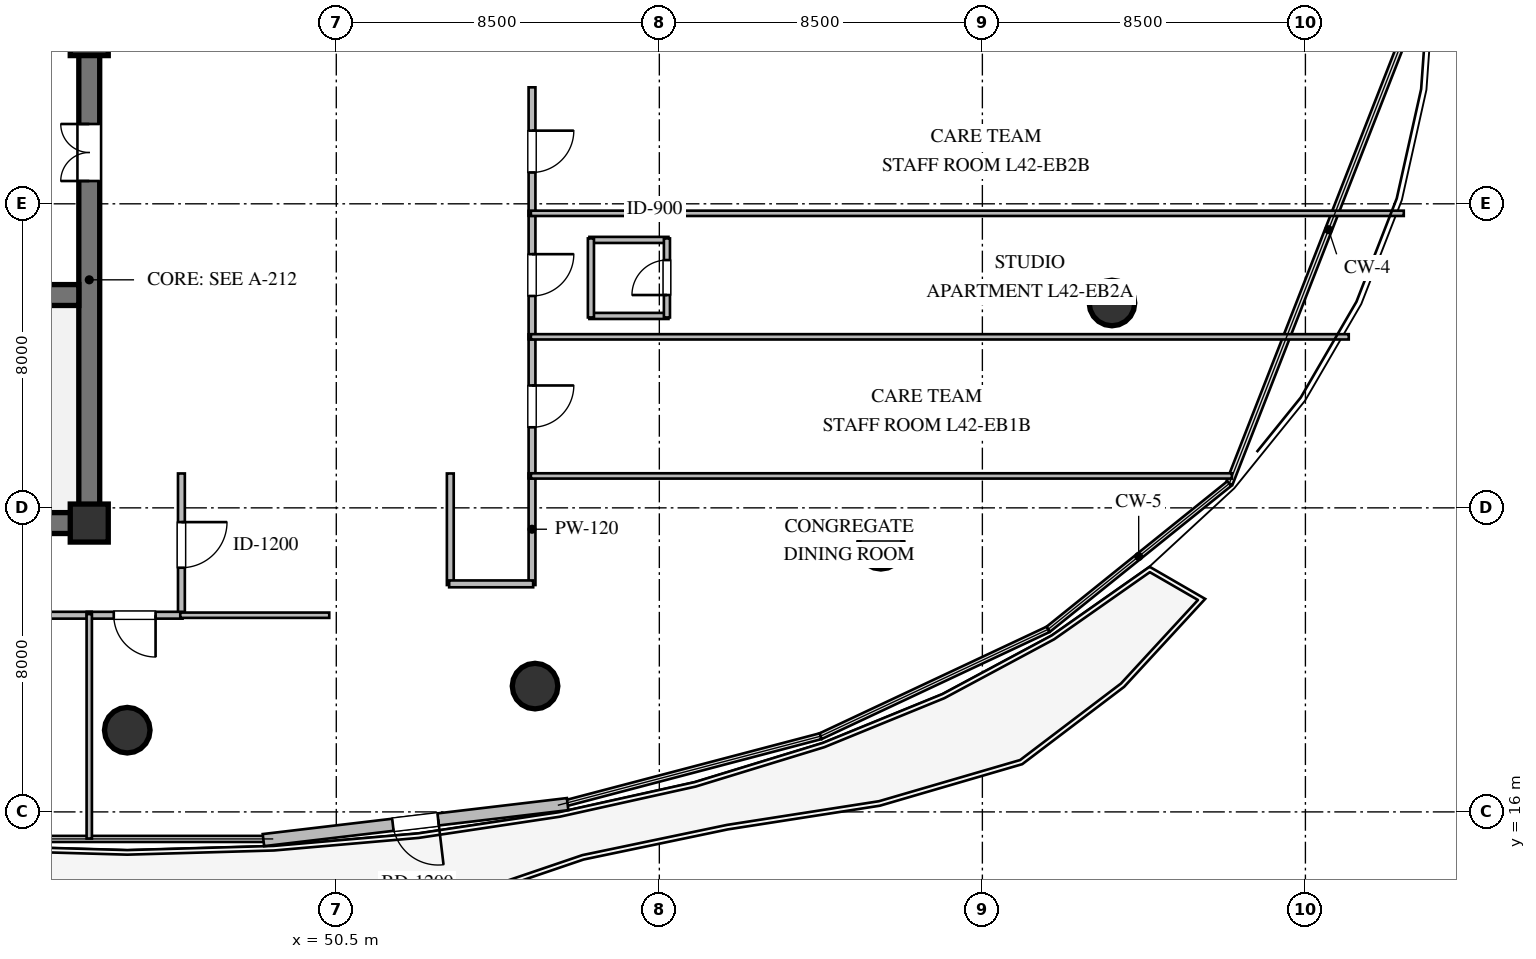
"""IFC4 building model, lengths in metres.
Left out: names, types, materials, properties, quantities, classifications, styles, units other than length and angle.
Written with IfcOpenShell. Run it as: python <this file> out.ifc"""

import sys

from ifc_helpers import new_model, si_unit, direction, frame, frame_2d, origin, origin_2d, place, context, subcontext, project, spatial, rectangle, circle, extrude, element, fill, save


model = new_model("IFC4")
c1 = context("Model", 3, precision=1e-05, world=origin(), true_north=direction((0.0, 1.0)))
c2 = subcontext(c1, "Body", "Model", "MODEL_VIEW")
j1 = project(units=[si_unit("LENGTHUNIT", "METRE"), si_unit("PLANEANGLEUNIT", "RADIAN")], contexts=[c1])
p1 = place(None, origin())
s1 = spatial("IfcSite", under=j1, at=p1, CompositionType="ELEMENT")
p2 = place(p1, origin())
s2 = spatial("IfcBuilding", under=s1, at=p2, CompositionType="ELEMENT")
p3 = place(p2, frame((0.0, 0.0, 160.2)))
s3 = spatial("IfcBuildingStorey", under=s2, at=p3, CompositionType="ELEMENT", Elevation=160.2)
p4 = place(p3, frame((21.725, 23.6, 0.0), z_axis=(0.0, 0.0, 1.0), x_axis=(1.0, 0.0, 0.0)))
e1 = element("IfcWall", 1, at=p4, inside=s3, PredefinedType="SHEAR", context=c2, shape_type="SweptSolid", body=[
    extrude(rectangle(XDim=22.55, YDim=0.55, at=frame_2d((11.275, 0.0))), origin(), (0.0, 0.0, 1.0), 3.36),
])
p5 = place(p3, frame((44.0, 23.875, 0.0), z_axis=(0.0, 0.0, 1.0), x_axis=(0.0, 1.0, 0.0)))
e2 = element("IfcWall", 2, at=p5, inside=s3, PredefinedType="SHEAR", context=c2, shape_type="SweptSolid", body=[
    extrude(rectangle(XDim=12.25, YDim=0.55, at=frame_2d((6.125, 0.0))), origin(), (0.0, 0.0, 1.0), 3.36),
])
p6 = place(p5, frame((8.725, 0.0, 0.0)))
e3 = element("IfcOpeningElement", 3, at=p6, cuts=e2, PredefinedType="OPENING", context=c2, shape_type="SweptSolid", body=[
    extrude(rectangle(XDim=1.5, YDim=2.15, at=frame_2d((0.75, 1.075))), frame((0.0, 0.285, 0.0), z_axis=(0.0, -1.0, 0.0), x_axis=(1.0, 0.0, 0.0)), (0.0, 0.0, 1.0), 0.57),
])
p7 = place(p3, frame((22.275, 29.6, 0.0), z_axis=(0.0, 0.0, 1.0), x_axis=(1.0, 0.0, 0.0)))
e4 = element("IfcWall", 4, at=p7, inside=s3, PredefinedType="SHEAR", context=c2, shape_type="SweptSolid", body=[
    extrude(rectangle(XDim=21.45, YDim=0.55, at=frame_2d((10.725, 0.0))), origin(), (0.0, 0.0, 1.0), 3.36),
])
p8 = place(p7, frame((12.175, 0.0, 0.0)))
e5 = element("IfcOpeningElement", 5, at=p8, cuts=e4, PredefinedType="OPENING", context=c2, shape_type="SweptSolid", body=[
    extrude(rectangle(XDim=1.15, YDim=2.1, at=frame_2d((0.575, 1.05))), frame((0.0, 0.285, 0.0), z_axis=(0.0, -1.0, 0.0), x_axis=(1.0, 0.0, 0.0)), (0.0, 0.0, 1.0), 0.57),
])
for number, where, z_axis, x_axis in (
    (6, (44.0, 23.6, 0.0), (0.0, 0.0, 1.0), (1.0, 0.0, 0.0)),
    (7, (44.0, 36.4, 0.0), (0.0, 0.0, 1.0), (1.0, 0.0, 0.0)),
):
    element("IfcColumn", number, at=place(p3, frame(where, z_axis=z_axis, x_axis=x_axis)), inside=s3, PredefinedType="COLUMN", context=c2, shape_type="SweptSolid", body=[
        extrude(rectangle(XDim=1.0, YDim=1.0, at=origin_2d()), origin(), (0.0, 0.0, 1.0), 3.6),
    ])
for number, where, z_axis, x_axis in (
    (8, (45.0, 18.15, 0.0), (0.0, 0.0, 1.0), (1.0, 0.0, 0.0)),
    (9, (55.73, 19.31, 0.0), (0.0, 0.0, 1.0), (1.0, 0.0, 0.0)),
    (10, (64.83, 22.99, 0.0), (0.0, 0.0, 1.0), (1.0, 0.0, 0.0)),
    (11, (70.91, 29.39, 0.0), (0.0, 0.0, 1.0), (1.0, 0.0, 0.0)),
):
    element("IfcColumn", number, at=place(p3, frame(where, z_axis=z_axis, x_axis=x_axis)), inside=s3, PredefinedType="COLUMN", context=c2, shape_type="SweptSolid", body=[
        extrude(circle(Radius=0.6, at=origin_2d()), origin(), (0.0, 0.0, 1.0), 3.6),
    ])
p9 = place(p3, frame((56.587, 16.205, 0.0), z_axis=(0.0, 0.0, 1.0), x_axis=(-0.993072847957, -0.117500292131, 0.0)))
e12 = element("IfcWall", 12, at=p9, inside=s3, PredefinedType="STANDARD", context=c2, shape_type="SweptSolid", body=[
    extrude(rectangle(XDim=8.06, YDim=0.32, at=frame_2d((4.03, 0.0))), origin(), (0.0, 0.0, 1.0), 3.36),
])
p10 = place(p9, frame((3.43, 0.0, 0.0)))
e13 = element("IfcOpeningElement", 13, at=p10, cuts=e12, PredefinedType="OPENING", context=c2, shape_type="SweptSolid", body=[
    extrude(rectangle(XDim=1.2, YDim=2.15, at=frame_2d((0.6, 1.075))), frame((0.0, 0.17, 0.0), z_axis=(0.0, -1.0, 0.0), x_axis=(1.0, 0.0, 0.0)), (0.0, 0.0, 1.0), 0.34),
])
for number, where, z_axis, x_axis in (
    (14, (57.16, 29.05, 0.0), (0.0, 0.0, 1.0), (1.0, 0.0, 0.0)),
    (15, (57.16, 31.05, 0.0), (0.0, 0.0, 1.0), (1.0, 0.0, 0.0)),
    (16, (57.2, 29.01, 0.0), (0.0, 0.0, 1.0), (0.0, 1.0, 0.0)),
):
    element("IfcWall", number, at=place(p3, frame(where, z_axis=z_axis, x_axis=x_axis)), inside=s3, PredefinedType="PLUMBINGWALL", context=c2, shape_type="SweptSolid", body=[
        extrude(rectangle(XDim=2.08, YDim=0.16, at=frame_2d((1.04, 0.0))), origin(), (0.0, 0.0, 1.0), 3.36),
    ])
p11 = place(p3, frame((59.2, 29.01, 0.0), z_axis=(0.0, 0.0, 1.0), x_axis=(0.0, 1.0, 0.0)))
e17 = element("IfcWall", 17, at=p11, inside=s3, PredefinedType="PLUMBINGWALL", context=c2, shape_type="SweptSolid", body=[
    extrude(rectangle(XDim=2.08, YDim=0.16, at=frame_2d((1.04, 0.0))), origin(), (0.0, 0.0, 1.0), 2.996),
])
p12 = place(p11, frame((0.59, 0.0, 0.0)))
e18 = element("IfcOpeningElement", 18, at=p12, cuts=e17, PredefinedType="OPENING", context=c2, shape_type="SweptSolid", body=[
    extrude(rectangle(XDim=0.92, YDim=2.1, at=frame_2d((0.46, 1.05))), frame((0.0, 0.09, 0.0), z_axis=(0.0, -1.0, 0.0), x_axis=(1.0, 0.0, 0.0)), (0.0, 0.0, 1.0), 0.18),
])
p13 = place(p3, frame((46.425, 24.905, 0.0), z_axis=(0.0, 0.0, 1.0), x_axis=(0.0, -1.0, 0.0)))
e19 = element("IfcWall", 19, at=p13, inside=s3, PredefinedType="PARTITIONING", context=c2, shape_type="SweptSolid", body=[
    extrude(rectangle(XDim=3.76, YDim=0.18, at=frame_2d((1.88, 0.0))), origin(), (0.0, 0.0, 1.0), 3.36),
])
p14 = place(p13, frame((1.28, 0.0, 0.0)))
e20 = element("IfcOpeningElement", 20, at=p14, cuts=e19, PredefinedType="OPENING", context=c2, shape_type="SweptSolid", body=[
    extrude(rectangle(XDim=1.2, YDim=2.15, at=frame_2d((0.6, 1.075))), frame((0.0, 0.1, 0.0), z_axis=(0.0, -1.0, 0.0), x_axis=(1.0, 0.0, 0.0)), (0.0, 0.0, 1.0), 0.2),
])
for number, where, z_axis, x_axis in (
    (21, (55.65, 24.905, 0.0), (0.0, 0.0, 1.0), (0.0, -1.0, 0.0)),
    (22, (53.5, 21.97, 0.0), (0.0, 0.0, 1.0), (0.0, 1.0, 0.0)),
):
    element("IfcWall", number, at=place(p3, frame(where, z_axis=z_axis, x_axis=x_axis)), inside=s3, PredefinedType="PARTITIONING", context=c2, shape_type="SweptSolid", body=[
        extrude(rectangle(XDim=2.935, YDim=0.18, at=frame_2d((1.468, 0.0))), origin(), (0.0, 0.0, 1.0), 3.36),
    ])
p15 = place(p3, frame((55.68, 22.0, 0.0), z_axis=(0.0, 0.0, 1.0), x_axis=(-1.0, 0.0, 0.0)))
e23 = element("IfcWall", 23, at=p15, inside=s3, PredefinedType="PARTITIONING", context=c2, shape_type="SweptSolid", body=[
    extrude(rectangle(XDim=2.21, YDim=0.18, at=frame_2d((1.105, 0.0))), origin(), (0.0, 0.0, 1.0), 3.36),
])
p16 = place(p3, frame((55.65, 28.565, 0.0), z_axis=(0.0, 0.0, 1.0), x_axis=(0.0, -1.0, 0.0)))
e24 = element("IfcWall", 24, at=p16, inside=s3, PredefinedType="PARTITIONING", context=c2, shape_type="SweptSolid", body=[
    extrude(rectangle(XDim=3.79, YDim=0.18, at=frame_2d((1.895, 0.0))), origin(), (0.0, 0.0, 1.0), 3.36),
])
p17 = place(p16, frame((1.345, 0.0, 0.0)))
e25 = element("IfcOpeningElement", 25, at=p17, cuts=e24, PredefinedType="OPENING", context=c2, shape_type="SweptSolid", body=[
    extrude(rectangle(XDim=1.1, YDim=2.1, at=frame_2d((0.55, 1.05))), frame((0.0, 0.1, 0.0), z_axis=(0.0, -1.0, 0.0), x_axis=(1.0, 0.0, 0.0)), (0.0, 0.0, 1.0), 0.2),
])
p18 = place(p3, frame((55.65, 31.815, 0.0), z_axis=(0.0, 0.0, 1.0), x_axis=(0.0, -1.0, 0.0)))
e26 = element("IfcWall", 26, at=p18, inside=s3, PredefinedType="PARTITIONING", context=c2, shape_type="SweptSolid", body=[
    extrude(rectangle(XDim=3.38, YDim=0.18, at=frame_2d((1.69, 0.0))), origin(), (0.0, 0.0, 1.0), 3.36),
])
p19 = place(p18, frame((1.14, 0.0, 0.0)))
e27 = element("IfcOpeningElement", 27, at=p19, cuts=e26, PredefinedType="OPENING", context=c2, shape_type="SweptSolid", body=[
    extrude(rectangle(XDim=1.1, YDim=2.1, at=frame_2d((0.55, 1.05))), frame((0.0, 0.1, 0.0), z_axis=(0.0, -1.0, 0.0), x_axis=(1.0, 0.0, 0.0)), (0.0, 0.0, 1.0), 0.2),
])
p20 = place(p3, frame((55.65, 35.065, 0.0), z_axis=(0.0, 0.0, 1.0), x_axis=(0.0, -1.0, 0.0)))
e28 = element("IfcWall", 28, at=p20, inside=s3, PredefinedType="PARTITIONING", context=c2, shape_type="SweptSolid", body=[
    extrude(rectangle(XDim=3.38, YDim=0.18, at=frame_2d((1.69, 0.0))), origin(), (0.0, 0.0, 1.0), 3.36),
])
p21 = place(p20, frame((1.14, 0.0, 0.0)))
e29 = element("IfcOpeningElement", 29, at=p21, cuts=e28, PredefinedType="OPENING", context=c2, shape_type="SweptSolid", body=[
    extrude(rectangle(XDim=1.1, YDim=2.1, at=frame_2d((0.55, 1.05))), frame((0.0, 0.1, 0.0), z_axis=(0.0, -1.0, 0.0), x_axis=(1.0, 0.0, 0.0)), (0.0, 0.0, 1.0), 0.2),
])
p22 = place(p3, frame((44.065, 21.175, 0.0), z_axis=(0.0, 0.0, 1.0), x_axis=(-1.0, 0.0, 0.0)))
e30 = element("IfcWall", 30, at=p22, inside=s3, PredefinedType="PARTITIONING", context=c2, shape_type="SweptSolid", body=[
    extrude(rectangle(XDim=14.13, YDim=0.18, at=frame_2d((7.065, 0.0))), origin(), (0.0, 0.0, 1.0), 2.657),
])
p23 = place(p22, frame((6.515, 0.0, 0.0)))
e31 = element("IfcOpeningElement", 31, at=p23, cuts=e30, PredefinedType="OPENING", context=c2, shape_type="SweptSolid", body=[
    extrude(rectangle(XDim=1.1, YDim=2.1, at=frame_2d((0.55, 1.05))), frame((0.0, 0.1, 0.0), z_axis=(0.0, -1.0, 0.0), x_axis=(1.0, 0.0, 0.0)), (0.0, 0.0, 1.0), 0.2),
])
p24 = place(p3, frame((46.455, 21.175, 0.0), z_axis=(0.0, 0.0, 1.0), x_axis=(-1.0, 0.0, 0.0)))
e32 = element("IfcWall", 32, at=p24, inside=s3, PredefinedType="PARTITIONING", context=c2, shape_type="SweptSolid", body=[
    extrude(rectangle(XDim=2.52, YDim=0.18, at=frame_2d((1.26, 0.0))), origin(), (0.0, 0.0, 1.0), 2.996),
])
p25 = place(p24, frame((0.71, 0.0, 0.0)))
e33 = element("IfcOpeningElement", 33, at=p25, cuts=e32, PredefinedType="OPENING", context=c2, shape_type="SweptSolid", body=[
    extrude(rectangle(XDim=1.1, YDim=2.1, at=frame_2d((0.55, 1.05))), frame((0.0, 0.1, 0.0), z_axis=(0.0, -1.0, 0.0), x_axis=(1.0, 0.0, 0.0)), (0.0, 0.0, 1.0), 0.2),
])
p26 = place(p3, frame((55.62, 24.84, 0.0), z_axis=(0.0, 0.0, 1.0), x_axis=(1.0, 0.0, 0.0)))
e34 = element("IfcWall", 34, at=p26, inside=s3, PredefinedType="PARTITIONING", context=c2, shape_type="SweptSolid", body=[
    extrude(rectangle(XDim=18.445, YDim=0.14, at=frame_2d((9.222, 0.0))), origin(), (0.0, 0.0, 1.0), 3.36),
])
p27 = place(p3, frame((50.315, 21.175, 0.0), z_axis=(0.0, 0.0, 1.0), x_axis=(-1.0, 0.0, 0.0)))
e35 = element("IfcWall", 35, at=p27, inside=s3, PredefinedType="PARTITIONING", context=c2, shape_type="SweptSolid", body=[
    extrude(rectangle(XDim=3.92, YDim=0.14, at=frame_2d((1.96, 0.0))), origin(), (0.0, 0.0, 1.0), 2.996),
])
p28 = place(p3, frame((55.62, 28.5, 0.0), z_axis=(0.0, 0.0, 1.0), x_axis=(1.0, 0.0, 0.0)))
e36 = element("IfcWall", 36, at=p28, inside=s3, PredefinedType="PARTITIONING", context=c2, shape_type="SweptSolid", body=[
    extrude(rectangle(XDim=21.52, YDim=0.14, at=frame_2d((10.76, 0.0))), origin(), (0.0, 0.0, 1.0), 2.806),
])
p29 = place(p3, frame((55.62, 31.75, 0.0), z_axis=(0.0, 0.0, 1.0), x_axis=(1.0, 0.0, 0.0)))
e37 = element("IfcWall", 37, at=p29, inside=s3, PredefinedType="PARTITIONING", context=c2, shape_type="SweptSolid", body=[
    extrude(rectangle(XDim=22.968, YDim=0.14, at=frame_2d((11.484, 0.0))), origin(), (0.0, 0.0, 1.0), 3.36),
])
p30 = place(p3, frame((44.0, 21.205, 0.0), z_axis=(0.0, 0.0, 1.0), x_axis=(0.0, -1.0, 0.0)))
e38 = element("IfcWall", 38, at=p30, inside=s3, PredefinedType="PARTITIONING", context=c2, shape_type="SweptSolid", body=[
    extrude(rectangle(XDim=5.906, YDim=0.14, at=frame_2d((2.953, 0.0))), origin(), (0.0, 0.0, 1.0), 2.806),
])
p31 = place(p10, origin())
e39 = element("IfcDoor", 39, at=p31, inside=s3, OperationType="SINGLE_SWING_LEFT", PredefinedType="DOOR", context=c2, shape_type="SweptSolid", body=[
    extrude(rectangle(XDim=1.2, YDim=2.15, at=frame_2d((0.6, 1.075))), frame((0.0, 0.025, 0.0), z_axis=(0.0, -1.0, 0.0), x_axis=(1.0, 0.0, 0.0)), (0.0, 0.0, 1.0), 0.05),
])
fill(e13, e39)
p32 = place(p6, origin())
e40 = element("IfcDoor", 40, at=p32, inside=s3, OperationType="DOUBLE_DOOR_SINGLE_SWING", PredefinedType="DOOR", context=c2, shape_type="SweptSolid", body=[
    extrude(rectangle(XDim=1.5, YDim=2.15, at=frame_2d((0.75, 1.075))), frame((0.0, 0.025, 0.0), z_axis=(0.0, -1.0, 0.0), x_axis=(1.0, 0.0, 0.0)), (0.0, 0.0, 1.0), 0.05),
])
fill(e3, e40)
p33 = place(p12, origin())
e41 = element("IfcDoor", 41, at=p33, inside=s3, OperationType="SINGLE_SWING_LEFT", PredefinedType="DOOR", context=c2, shape_type="SweptSolid", body=[
    extrude(rectangle(XDim=0.92, YDim=2.1, at=frame_2d((0.46, 1.05))), frame((0.0, 0.025, 0.0), z_axis=(0.0, -1.0, 0.0), x_axis=(1.0, 0.0, 0.0)), (0.0, 0.0, 1.0), 0.05),
])
fill(e18, e41)
p34 = place(p14, origin())
e42 = element("IfcDoor", 42, at=p34, inside=s3, OperationType="SINGLE_SWING_LEFT", PredefinedType="DOOR", context=c2, shape_type="SweptSolid", body=[
    extrude(rectangle(XDim=1.2, YDim=2.15, at=frame_2d((0.6, 1.075))), frame((0.0, 0.025, 0.0), z_axis=(0.0, -1.0, 0.0), x_axis=(1.0, 0.0, 0.0)), (0.0, 0.0, 1.0), 0.05),
])
fill(e20, e42)
p35 = place(p17, origin())
e43 = element("IfcDoor", 43, at=p35, inside=s3, OperationType="SINGLE_SWING_LEFT", PredefinedType="DOOR", context=c2, shape_type="SweptSolid", body=[
    extrude(rectangle(XDim=1.1, YDim=2.1, at=frame_2d((0.55, 1.05))), frame((0.0, 0.025, 0.0), z_axis=(0.0, -1.0, 0.0), x_axis=(1.0, 0.0, 0.0)), (0.0, 0.0, 1.0), 0.05),
])
fill(e25, e43)
p36 = place(p19, origin())
e44 = element("IfcDoor", 44, at=p36, inside=s3, OperationType="SINGLE_SWING_LEFT", PredefinedType="DOOR", context=c2, shape_type="SweptSolid", body=[
    extrude(rectangle(XDim=1.1, YDim=2.1, at=frame_2d((0.55, 1.05))), frame((0.0, 0.025, 0.0), z_axis=(0.0, -1.0, 0.0), x_axis=(1.0, 0.0, 0.0)), (0.0, 0.0, 1.0), 0.05),
])
fill(e27, e44)
p37 = place(p21, origin())
e45 = element("IfcDoor", 45, at=p37, inside=s3, OperationType="SINGLE_SWING_LEFT", PredefinedType="DOOR", context=c2, shape_type="SweptSolid", body=[
    extrude(rectangle(XDim=1.1, YDim=2.1, at=frame_2d((0.55, 1.05))), frame((0.0, 0.025, 0.0), z_axis=(0.0, -1.0, 0.0), x_axis=(1.0, 0.0, 0.0)), (0.0, 0.0, 1.0), 0.05),
])
fill(e29, e45)
p38 = place(p25, origin())
e46 = element("IfcDoor", 46, at=p38, inside=s3, OperationType="SINGLE_SWING_LEFT", PredefinedType="DOOR", context=c2, shape_type="SweptSolid", body=[
    extrude(rectangle(XDim=1.1, YDim=2.1, at=frame_2d((0.55, 1.05))), frame((0.0, 0.025, 0.0), z_axis=(0.0, -1.0, 0.0), x_axis=(1.0, 0.0, 0.0)), (0.0, 0.0, 1.0), 0.05),
])
fill(e33, e46)
save(model, sys.argv[1])
